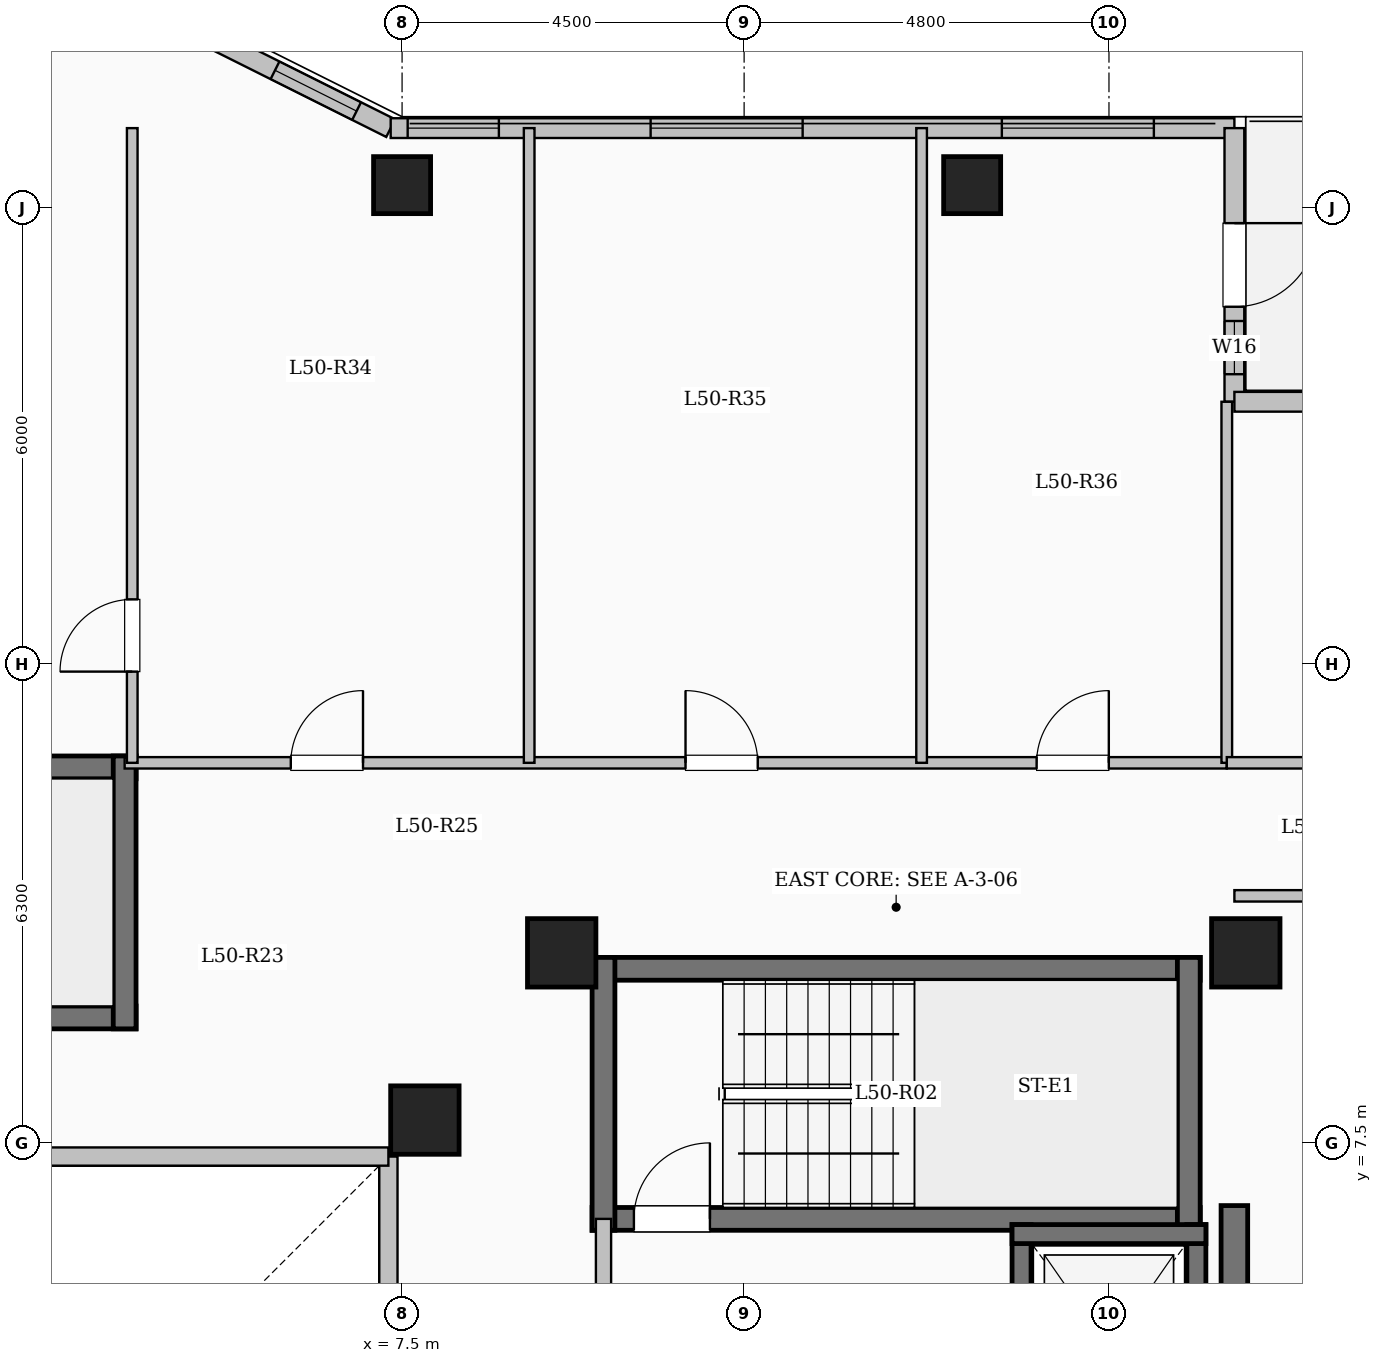
"""IFC4 building model, lengths in metres.
Left out: names, types, materials, properties, quantities, classifications, styles, units other than length and angle.
Written with IfcOpenShell. Run it as: python <this file> out.ifc"""

import sys

from ifc_helpers import new_model, si_unit, direction, frame, frame_2d, origin, origin_2d, place, context, subcontext, project, spatial, rectangle, extrude, element, fill, save


model = new_model("IFC4")
c1 = context("Model", 3, precision=1e-05, world=origin(), true_north=direction((0.0, 1.0)))
c2 = subcontext(c1, "Body", "Model", "MODEL_VIEW")
j1 = project(units=[si_unit("LENGTHUNIT", "METRE"), si_unit("PLANEANGLEUNIT", "RADIAN")], contexts=[c1])
p1 = place(None, origin())
s1 = spatial("IfcSite", under=j1, at=p1, CompositionType="ELEMENT")
p2 = place(p1, origin())
s2 = spatial("IfcBuilding", under=s1, at=p2, CompositionType="ELEMENT")
p3 = place(p2, frame((0.0, 0.0, 186.9)))
s3 = spatial("IfcBuildingStorey", under=s2, at=p3, CompositionType="ELEMENT", Elevation=186.9)
for number, where, z_axis, x_axis in (
    (1, (7.8, 7.8, 0.0), (0.0, 0.0, 1.0), (1.0, 0.0, 0.0)),
    (2, (9.6, 10.0, 0.0), (0.0, 0.0, 1.0), (1.0, 0.0, 0.0)),
    (3, (18.6, 10.0, 0.0), (0.0, 0.0, 1.0), (1.0, 0.0, 0.0)),
):
    element("IfcColumn", number, at=place(p3, frame(where, z_axis=z_axis, x_axis=x_axis)), inside=s3, PredefinedType="COLUMN", context=c2, shape_type="SweptSolid", body=[
        extrude(rectangle(XDim=0.9, YDim=0.9, at=origin_2d()), origin(), (0.0, 0.0, 1.0), 3.35),
    ])
for number, where, z_axis, x_axis in (
    (4, (7.5, 20.1, 0.0), (0.0, 0.0, 1.0), (1.0, 0.0, 0.0)),
    (5, (15.0, 20.1, 0.0), (0.0, 0.0, 1.0), (1.0, 0.0, 0.0)),
):
    element("IfcColumn", number, at=place(p3, frame(where, z_axis=z_axis, x_axis=x_axis)), inside=s3, PredefinedType="COLUMN", context=c2, shape_type="SweptSolid", body=[
        extrude(rectangle(XDim=0.75, YDim=0.75, at=origin_2d()), origin(), (0.0, 0.0, 1.0), 3.35),
    ])
p4 = place(p3, frame((7.32, -7.32, 0.0), z_axis=(0.0, 0.0, 1.0), x_axis=(0.0, 1.0, 0.0)))
e6 = element("IfcWall", 6, at=p4, inside=s3, PredefinedType="SOLIDWALL", context=c2, shape_type="SweptSolid", body=[
    extrude(rectangle(XDim=14.64, YDim=0.24, at=frame_2d((7.32, 0.0))), origin(), (0.0, 0.0, 1.0), 3.1),
])
p5 = place(p4, frame((6.62, 0.0, 0.95)))
e7 = element("IfcOpeningElement", 7, at=p5, cuts=e6, PredefinedType="OPENING", context=c2, shape_type="SweptSolid", body=[
    extrude(rectangle(XDim=1.4, YDim=1.5, at=frame_2d((0.7, 0.75))), frame((0.0, 0.13, 0.0), z_axis=(0.0, -1.0, 0.0), x_axis=(1.0, 0.0, 0.0)), (0.0, 0.0, 1.0), 0.26),
])
p6 = place(p3, frame((7.32, 7.32, 0.0), z_axis=(0.0, 0.0, 1.0), x_axis=(-1.0, 0.0, 0.0)))
e8 = element("IfcWall", 8, at=p6, inside=s3, PredefinedType="SOLIDWALL", context=c2, shape_type="SweptSolid", body=[
    extrude(rectangle(XDim=14.64, YDim=0.24, at=frame_2d((7.32, 0.0))), origin(), (0.0, 0.0, 1.0), 3.1),
])
p7 = place(p6, frame((6.62, 0.0, 0.95)))
e9 = element("IfcOpeningElement", 9, at=p7, cuts=e8, PredefinedType="OPENING", context=c2, shape_type="SweptSolid", body=[
    extrude(rectangle(XDim=1.4, YDim=1.5, at=frame_2d((0.7, 0.75))), frame((0.0, 0.13, 0.0), z_axis=(0.0, -1.0, 0.0), x_axis=(1.0, 0.0, 0.0)), (0.0, 0.0, 1.0), 0.26),
])
p8 = place(p3, frame((4.35, 22.35, 0.0), z_axis=(0.0, 0.0, 1.0), x_axis=(0.894427191, -0.4472135955, 0.0)))
e10 = element("IfcWall", 10, at=p8, inside=s3, PredefinedType="SOLIDWALL", context=c2, shape_type="SweptSolid", body=[
    extrude(rectangle(XDim=3.354, YDim=0.26, at=frame_2d((1.677, 0.0))), origin(), (0.0, 0.0, 1.0), 3.1),
])
p9 = place(p8, frame((1.653, 0.0, 0.95)))
e11 = element("IfcOpeningElement", 11, at=p9, cuts=e10, PredefinedType="OPENING", context=c2, shape_type="SweptSolid", body=[
    extrude(rectangle(XDim=1.2, YDim=1.5, at=frame_2d((0.6, 0.75))), frame((0.0, 0.14, 0.0), z_axis=(0.0, -1.0, 0.0), x_axis=(1.0, 0.0, 0.0)), (0.0, 0.0, 1.0), 0.28),
])
p10 = place(p3, frame((7.35, 20.85, 0.0), z_axis=(0.0, 0.0, 1.0), x_axis=(1.0, 0.0, 0.0)))
e12 = element("IfcWall", 12, at=p10, inside=s3, PredefinedType="SOLIDWALL", context=c2, shape_type="SweptSolid", body=[
    extrude(rectangle(XDim=11.1, YDim=0.26, at=frame_2d((5.55, 0.0))), origin(), (0.0, 0.0, 1.0), 3.1),
])
p11 = place(p10, frame((0.223, 0.0, 0.95)))
e13 = element("IfcOpeningElement", 13, at=p11, cuts=e12, PredefinedType="OPENING", context=c2, shape_type="SweptSolid", body=[
    extrude(rectangle(XDim=1.2, YDim=1.5, at=frame_2d((0.6, 0.75))), frame((0.0, 0.14, 0.0), z_axis=(0.0, -1.0, 0.0), x_axis=(1.0, 0.0, 0.0)), (0.0, 0.0, 1.0), 0.28),
])
p12 = place(p10, frame((3.42, 0.0, 0.9)))
e14 = element("IfcOpeningElement", 14, at=p12, cuts=e12, PredefinedType="OPENING", context=c2, shape_type="SweptSolid", body=[
    extrude(rectangle(XDim=2.0, YDim=1.7, at=frame_2d((1.0, 0.85))), frame((0.0, 0.14, 0.0), z_axis=(0.0, -1.0, 0.0), x_axis=(1.0, 0.0, 0.0)), (0.0, 0.0, 1.0), 0.28),
])
p13 = place(p10, frame((8.041, 0.0, 0.9)))
e15 = element("IfcOpeningElement", 15, at=p13, cuts=e12, PredefinedType="OPENING", context=c2, shape_type="SweptSolid", body=[
    extrude(rectangle(XDim=2.0, YDim=1.7, at=frame_2d((1.0, 0.85))), frame((0.0, 0.14, 0.0), z_axis=(0.0, -1.0, 0.0), x_axis=(1.0, 0.0, 0.0)), (0.0, 0.0, 1.0), 0.28),
])
p14 = place(p3, frame((18.45, 20.85, 0.0), z_axis=(0.0, 0.0, 1.0), x_axis=(0.0, -1.0, 0.0)))
e16 = element("IfcWall", 16, at=p14, inside=s3, PredefinedType="SOLIDWALL", context=c2, shape_type="SweptSolid", body=[
    extrude(rectangle(XDim=3.6, YDim=0.26, at=frame_2d((1.8, 0.0))), origin(), (0.0, 0.0, 1.0), 3.1),
])
p15 = place(p14, frame((1.25, 0.0, 0.0)))
e17 = element("IfcOpeningElement", 17, at=p15, cuts=e16, PredefinedType="OPENING", context=c2, shape_type="SweptSolid", body=[
    extrude(rectangle(XDim=1.1, YDim=2.2, at=frame_2d((0.55, 1.1))), frame((0.0, 0.14, 0.0), z_axis=(0.0, -1.0, 0.0), x_axis=(1.0, 0.0, 0.0)), (0.0, 0.0, 1.0), 0.28),
])
p16 = place(p14, frame((2.538, 0.0, 0.95)))
e18 = element("IfcOpeningElement", 18, at=p16, cuts=e16, PredefinedType="OPENING", context=c2, shape_type="SweptSolid", body=[
    extrude(rectangle(XDim=0.7, YDim=1.5, at=frame_2d((0.35, 0.75))), frame((0.0, 0.14, 0.0), z_axis=(0.0, -1.0, 0.0), x_axis=(1.0, 0.0, 0.0)), (0.0, 0.0, 1.0), 0.28),
])
p17 = place(p3, frame((18.45, 17.25, 0.0), z_axis=(0.0, 0.0, 1.0), x_axis=(1.0, 0.0, 0.0)))
e19 = element("IfcWall", 19, at=p17, inside=s3, PredefinedType="SOLIDWALL", context=c2, shape_type="SweptSolid", body=[
    extrude(rectangle(XDim=5.1, YDim=0.26, at=frame_2d((2.55, 0.0))), origin(), (0.0, 0.0, 1.0), 3.1),
])
p18 = place(p17, frame((1.525, 0.0, 0.9)))
e20 = element("IfcOpeningElement", 20, at=p18, cuts=e19, PredefinedType="OPENING", context=c2, shape_type="SweptSolid", body=[
    extrude(rectangle(XDim=2.0, YDim=1.7, at=frame_2d((1.0, 0.85))), frame((0.0, 0.14, 0.0), z_axis=(0.0, -1.0, 0.0), x_axis=(1.0, 0.0, 0.0)), (0.0, 0.0, 1.0), 0.28),
])
p19 = place(p3, frame((10.0, 9.79, 0.0), z_axis=(0.0, 0.0, 1.0), x_axis=(1.0, 0.0, 0.0)))
e21 = element("IfcWall", 21, at=p19, inside=s3, PredefinedType="SHEAR", context=c2, shape_type="SweptSolid", body=[
    extrude(rectangle(XDim=8.0, YDim=0.3, at=frame_2d((4.0, 0.0))), origin(), (0.0, 0.0, 1.0), 3.35),
])
p20 = place(p3, frame((10.0, 6.5, 0.0), z_axis=(0.0, 0.0, 1.0), x_axis=(1.0, 0.0, 0.0)))
e22 = element("IfcWall", 22, at=p20, inside=s3, PredefinedType="SHEAR", context=c2, shape_type="SweptSolid", body=[
    extrude(rectangle(XDim=8.0, YDim=0.3, at=frame_2d((4.0, 0.0))), origin(), (0.0, 0.0, 1.0), 3.35),
])
p21 = place(p20, frame((0.55, 0.0, 0.0)))
e23 = element("IfcOpeningElement", 23, at=p21, cuts=e22, PredefinedType="OPENING", context=c2, shape_type="SweptSolid", body=[
    extrude(rectangle(XDim=1.0, YDim=2.15, at=frame_2d((0.5, 1.075))), frame((0.0, 0.16, 0.0), z_axis=(0.0, -1.0, 0.0), x_axis=(1.0, 0.0, 0.0)), (0.0, 0.0, 1.0), 0.32),
])
for number, where, z_axis, x_axis in (
    (24, (10.15, 6.35, 0.0), (0.0, 0.0, 1.0), (0.0, 1.0, 0.0)),
    (25, (17.85, 6.35, 0.0), (0.0, 0.0, 1.0), (0.0, 1.0, 0.0)),
):
    element("IfcWall", number, at=place(p3, frame(where, z_axis=z_axis, x_axis=x_axis)), inside=s3, PredefinedType="SHEAR", context=c2, shape_type="SweptSolid", body=[
        extrude(rectangle(XDim=3.59, YDim=0.3, at=frame_2d((1.795, 0.0))), origin(), (0.0, 0.0, 1.0), 3.35),
    ])
p22 = place(p3, frame((-4.0, 12.44, 0.0), z_axis=(0.0, 0.0, 1.0), x_axis=(1.0, 0.0, 0.0)))
e26 = element("IfcWall", 26, at=p22, inside=s3, PredefinedType="SHEAR", context=c2, shape_type="SweptSolid", body=[
    extrude(rectangle(XDim=8.0, YDim=0.3, at=frame_2d((4.0, 0.0))), origin(), (0.0, 0.0, 1.0), 3.35),
])
p23 = place(p3, frame((-4.0, 9.15, 0.0), z_axis=(0.0, 0.0, 1.0), x_axis=(1.0, 0.0, 0.0)))
e27 = element("IfcWall", 27, at=p23, inside=s3, PredefinedType="SHEAR", context=c2, shape_type="SweptSolid", body=[
    extrude(rectangle(XDim=8.0, YDim=0.3, at=frame_2d((4.0, 0.0))), origin(), (0.0, 0.0, 1.0), 3.35),
])
p24 = place(p23, frame((0.55, 0.0, 0.0)))
e28 = element("IfcOpeningElement", 28, at=p24, cuts=e27, PredefinedType="OPENING", context=c2, shape_type="SweptSolid", body=[
    extrude(rectangle(XDim=1.0, YDim=2.15, at=frame_2d((0.5, 1.075))), frame((0.0, 0.16, 0.0), z_axis=(0.0, -1.0, 0.0), x_axis=(1.0, 0.0, 0.0)), (0.0, 0.0, 1.0), 0.32),
])
p25 = place(p3, frame((3.85, 9.0, 0.0), z_axis=(0.0, 0.0, 1.0), x_axis=(0.0, 1.0, 0.0)))
e29 = element("IfcWall", 29, at=p25, inside=s3, PredefinedType="SHEAR", context=c2, shape_type="SweptSolid", body=[
    extrude(rectangle(XDim=3.59, YDim=0.3, at=frame_2d((1.795, 0.0))), origin(), (0.0, 0.0, 1.0), 3.35),
])
p26 = place(p3, frame((10.15, 3.25, 0.0), z_axis=(0.0, 0.0, 1.0), x_axis=(0.0, 1.0, 0.0)))
e30 = element("IfcWall", 30, at=p26, inside=s3, PredefinedType="SOLIDWALL", context=c2, shape_type="SweptSolid", body=[
    extrude(rectangle(XDim=3.25, YDim=0.2, at=frame_2d((1.625, 0.0))), origin(), (0.0, 0.0, 1.0), 3.1),
])
p27 = place(p26, frame((1.1, 0.0, 0.0)))
e31 = element("IfcOpeningElement", 31, at=p27, cuts=e30, PredefinedType="OPENING", context=c2, shape_type="SweptSolid", body=[
    extrude(rectangle(XDim=1.02, YDim=2.15, at=frame_2d((0.51, 1.075))), frame((0.0, 0.11, 0.0), z_axis=(0.0, -1.0, 0.0), x_axis=(1.0, 0.0, 0.0)), (0.0, 0.0, 1.0), 0.22),
])
p28 = place(p3, frame((15.65, 3.175, 0.0), z_axis=(0.0, 0.0, 1.0), x_axis=(0.0, 1.0, 0.0)))
e32 = element("IfcWall", 32, at=p28, inside=s3, PredefinedType="SHEAR", context=c2, shape_type="SweptSolid", body=[
    extrude(rectangle(XDim=3.25, YDim=0.25, at=frame_2d((1.625, 0.0))), origin(), (0.0, 0.0, 1.0), 3.35),
])
p29 = place(p28, frame((1.075, 0.0, 0.0)))
e33 = element("IfcOpeningElement", 33, at=p29, cuts=e32, PredefinedType="OPENING", context=c2, shape_type="SweptSolid", body=[
    extrude(rectangle(XDim=1.1, YDim=2.15, at=frame_2d((0.55, 1.075))), frame((0.0, 0.135, 0.0), z_axis=(0.0, -1.0, 0.0), x_axis=(1.0, 0.0, 0.0)), (0.0, 0.0, 1.0), 0.27),
])
p30 = place(p3, frame((17.95, 3.175, 0.0), z_axis=(0.0, 0.0, 1.0), x_axis=(0.0, 1.0, 0.0)))
e34 = element("IfcWall", 34, at=p30, inside=s3, PredefinedType="SHEAR", context=c2, shape_type="SweptSolid", body=[
    extrude(rectangle(XDim=3.25, YDim=0.25, at=frame_2d((1.625, 0.0))), origin(), (0.0, 0.0, 1.0), 3.35),
])
p31 = place(p3, frame((15.525, 6.3, 0.0), z_axis=(0.0, 0.0, 1.0), x_axis=(1.0, 0.0, 0.0)))
e35 = element("IfcWall", 35, at=p31, inside=s3, PredefinedType="SHEAR", context=c2, shape_type="SweptSolid", body=[
    extrude(rectangle(XDim=2.55, YDim=0.25, at=frame_2d((1.275, 0.0))), origin(), (0.0, 0.0, 1.0), 3.35),
])
p32 = place(p3, frame((18.45, -7.375, 0.0), z_axis=(0.0, 0.0, 1.0), x_axis=(0.0, 1.0, 0.0)))
e36 = element("IfcWall", 36, at=p32, inside=s3, PredefinedType="SHEAR", context=c2, shape_type="SweptSolid", body=[
    extrude(rectangle(XDim=14.05, YDim=0.35, at=frame_2d((7.025, 0.0))), origin(), (0.0, 0.0, 1.0), 3.35),
])
p33 = place(p3, frame((3.85, 12.5, 0.0), z_axis=(0.0, 0.0, 1.0), x_axis=(1.0, 0.0, 0.0)))
e37 = element("IfcWall", 37, at=p33, inside=s3, PredefinedType="PARTITIONING", context=c2, shape_type="SweptSolid", body=[
    extrude(rectangle(XDim=14.5, YDim=0.15, at=frame_2d((7.25, 0.0))), origin(), (0.0, 0.0, 1.0), 3.1),
])
p34 = place(p33, frame((2.186, 0.0, 0.0)))
e38 = element("IfcOpeningElement", 38, at=p34, cuts=e37, PredefinedType="OPENING", context=c2, shape_type="SweptSolid", body=[
    extrude(rectangle(XDim=0.95, YDim=2.15, at=frame_2d((0.475, 1.075))), frame((0.0, 0.085, 0.0), z_axis=(0.0, -1.0, 0.0), x_axis=(1.0, 0.0, 0.0)), (0.0, 0.0, 1.0), 0.17),
])
p35 = place(p33, frame((7.379, 0.0, 0.0)))
e39 = element("IfcOpeningElement", 39, at=p35, cuts=e37, PredefinedType="OPENING", context=c2, shape_type="SweptSolid", body=[
    extrude(rectangle(XDim=0.95, YDim=2.15, at=frame_2d((0.475, 1.075))), frame((0.0, 0.085, 0.0), z_axis=(0.0, -1.0, 0.0), x_axis=(1.0, 0.0, 0.0)), (0.0, 0.0, 1.0), 0.17),
])
p36 = place(p33, frame((11.998, 0.0, 0.0)))
e40 = element("IfcOpeningElement", 40, at=p36, cuts=e37, PredefinedType="OPENING", context=c2, shape_type="SweptSolid", body=[
    extrude(rectangle(XDim=0.95, YDim=2.15, at=frame_2d((0.475, 1.075))), frame((0.0, 0.085, 0.0), z_axis=(0.0, -1.0, 0.0), x_axis=(1.0, 0.0, 0.0)), (0.0, 0.0, 1.0), 0.17),
])
p37 = place(p3, frame((3.95, 12.5, 0.0), z_axis=(0.0, 0.0, 1.0), x_axis=(0.0, 1.0, 0.0)))
e41 = element("IfcWall", 41, at=p37, inside=s3, PredefinedType="PARTITIONING", context=c2, shape_type="SweptSolid", body=[
    extrude(rectangle(XDim=8.35, YDim=0.14, at=frame_2d((4.175, 0.0))), origin(), (0.0, 0.0, 1.0), 3.1),
])
p38 = place(p37, frame((1.2, 0.0, 0.0)))
e42 = element("IfcOpeningElement", 42, at=p38, cuts=e41, PredefinedType="OPENING", context=c2, shape_type="SweptSolid", body=[
    extrude(rectangle(XDim=0.95, YDim=2.15, at=frame_2d((0.475, 1.075))), frame((0.0, 0.08, 0.0), z_axis=(0.0, -1.0, 0.0), x_axis=(1.0, 0.0, 0.0)), (0.0, 0.0, 1.0), 0.16),
])
for number, where, z_axis, x_axis in (
    (43, (9.172, 12.5, 0.0), (0.0, 0.0, 1.0), (0.0, 1.0, 0.0)),
    (44, (14.335, 12.5, 0.0), (0.0, 0.0, 1.0), (0.0, 1.0, 0.0)),
):
    element("IfcWall", number, at=place(p3, frame(where, z_axis=z_axis, x_axis=x_axis)), inside=s3, PredefinedType="PARTITIONING", context=c2, shape_type="SweptSolid", body=[
        extrude(rectangle(XDim=8.35, YDim=0.14, at=frame_2d((4.175, 0.0))), origin(), (0.0, 0.0, 1.0), 3.1),
    ])
p39 = place(p3, frame((18.45, 10.75, 0.0), z_axis=(0.0, 0.0, 1.0), x_axis=(1.0, 0.0, 0.0)))
e45 = element("IfcWall", 45, at=p39, inside=s3, PredefinedType="PARTITIONING", context=c2, shape_type="SweptSolid", body=[
    extrude(rectangle(XDim=5.13, YDim=0.15, at=frame_2d((2.565, 0.0))), origin(), (0.0, 0.0, 1.0), 3.1),
])
p40 = place(p3, frame((18.35, 12.5, 0.0), z_axis=(0.0, 0.0, 1.0), x_axis=(0.0, 1.0, 0.0)))
e46 = element("IfcWall", 46, at=p40, inside=s3, PredefinedType="PARTITIONING", context=c2, shape_type="SweptSolid", body=[
    extrude(rectangle(XDim=4.75, YDim=0.14, at=frame_2d((2.375, 0.0))), origin(), (0.0, 0.0, 1.0), 3.1),
])
p41 = place(p3, frame((18.35, 12.5, 0.0), z_axis=(0.0, 0.0, 1.0), x_axis=(1.0, 0.0, 0.0)))
e47 = element("IfcWall", 47, at=p41, inside=s3, PredefinedType="PARTITIONING", context=c2, shape_type="SweptSolid", body=[
    extrude(rectangle(XDim=5.23, YDim=0.15, at=frame_2d((2.615, 0.0))), origin(), (0.0, 0.0, 1.0), 3.1),
])
p42 = place(p41, frame((2.14, 0.0, 0.0)))
e48 = element("IfcOpeningElement", 48, at=p42, cuts=e47, PredefinedType="OPENING", context=c2, shape_type="SweptSolid", body=[
    extrude(rectangle(XDim=0.95, YDim=2.15, at=frame_2d((0.475, 1.075))), frame((0.0, 0.085, 0.0), z_axis=(0.0, -1.0, 0.0), x_axis=(1.0, 0.0, 0.0)), (0.0, 0.0, 1.0), 0.17),
])
p43 = place(p9, origin())
e49 = element("IfcWindow", 49, at=p43, inside=s3, PartitioningType="SINGLE_PANEL", PredefinedType="WINDOW", context=c2, shape_type="SweptSolid", body=[
    extrude(rectangle(XDim=1.2, YDim=1.5, at=frame_2d((0.6, 0.75))), frame((0.0, 0.03, 0.0), z_axis=(0.0, -1.0, 0.0), x_axis=(1.0, 0.0, 0.0)), (0.0, 0.0, 1.0), 0.06),
])
fill(e11, e49)
p44 = place(p11, origin())
e50 = element("IfcWindow", 50, at=p44, inside=s3, PartitioningType="SINGLE_PANEL", PredefinedType="WINDOW", context=c2, shape_type="SweptSolid", body=[
    extrude(rectangle(XDim=1.2, YDim=1.5, at=frame_2d((0.6, 0.75))), frame((0.0, 0.03, 0.0), z_axis=(0.0, -1.0, 0.0), x_axis=(1.0, 0.0, 0.0)), (0.0, 0.0, 1.0), 0.06),
])
fill(e13, e50)
p45 = place(p12, origin())
e51 = element("IfcWindow", 51, at=p45, inside=s3, PartitioningType="SINGLE_PANEL", PredefinedType="WINDOW", context=c2, shape_type="SweptSolid", body=[
    extrude(rectangle(XDim=2.0, YDim=1.7, at=frame_2d((1.0, 0.85))), frame((0.0, 0.03, 0.0), z_axis=(0.0, -1.0, 0.0), x_axis=(1.0, 0.0, 0.0)), (0.0, 0.0, 1.0), 0.06),
])
fill(e14, e51)
p46 = place(p13, origin())
e52 = element("IfcWindow", 52, at=p46, inside=s3, PartitioningType="SINGLE_PANEL", PredefinedType="WINDOW", context=c2, shape_type="SweptSolid", body=[
    extrude(rectangle(XDim=2.0, YDim=1.7, at=frame_2d((1.0, 0.85))), frame((0.0, 0.03, 0.0), z_axis=(0.0, -1.0, 0.0), x_axis=(1.0, 0.0, 0.0)), (0.0, 0.0, 1.0), 0.06),
])
fill(e15, e52)
p47 = place(p15, origin())
e53 = element("IfcDoor", 53, at=p47, inside=s3, OperationType="SINGLE_SWING_LEFT", PredefinedType="DOOR", context=c2, shape_type="SweptSolid", body=[
    extrude(rectangle(XDim=1.1, YDim=2.2, at=frame_2d((0.55, 1.1))), frame((0.0, 0.025, 0.0), z_axis=(0.0, -1.0, 0.0), x_axis=(1.0, 0.0, 0.0)), (0.0, 0.0, 1.0), 0.05),
])
fill(e17, e53)
p48 = place(p16, origin())
e54 = element("IfcWindow", 54, at=p48, inside=s3, PartitioningType="SINGLE_PANEL", PredefinedType="WINDOW", context=c2, shape_type="SweptSolid", body=[
    extrude(rectangle(XDim=0.7, YDim=1.5, at=frame_2d((0.35, 0.75))), frame((0.0, 0.03, 0.0), z_axis=(0.0, -1.0, 0.0), x_axis=(1.0, 0.0, 0.0)), (0.0, 0.0, 1.0), 0.06),
])
fill(e18, e54)
p49 = place(p21, origin())
e55 = element("IfcDoor", 55, at=p49, inside=s3, OperationType="SINGLE_SWING_RIGHT", PredefinedType="DOOR", context=c2, shape_type="SweptSolid", body=[
    extrude(rectangle(XDim=1.0, YDim=2.15, at=frame_2d((0.5, 1.075))), frame((0.0, 0.025, 0.0), z_axis=(0.0, -1.0, 0.0), x_axis=(1.0, 0.0, 0.0)), (0.0, 0.0, 1.0), 0.05),
])
fill(e23, e55)
p50 = place(p34, origin())
e56 = element("IfcDoor", 56, at=p50, inside=s3, OperationType="SINGLE_SWING_RIGHT", PredefinedType="DOOR", context=c2, shape_type="SweptSolid", body=[
    extrude(rectangle(XDim=0.95, YDim=2.15, at=frame_2d((0.475, 1.075))), frame((0.0, 0.025, 0.0), z_axis=(0.0, -1.0, 0.0), x_axis=(1.0, 0.0, 0.0)), (0.0, 0.0, 1.0), 0.05),
])
fill(e38, e56)
p51 = place(p35, origin())
e57 = element("IfcDoor", 57, at=p51, inside=s3, OperationType="SINGLE_SWING_LEFT", PredefinedType="DOOR", context=c2, shape_type="SweptSolid", body=[
    extrude(rectangle(XDim=0.95, YDim=2.15, at=frame_2d((0.475, 1.075))), frame((0.0, 0.025, 0.0), z_axis=(0.0, -1.0, 0.0), x_axis=(1.0, 0.0, 0.0)), (0.0, 0.0, 1.0), 0.05),
])
fill(e39, e57)
p52 = place(p36, origin())
e58 = element("IfcDoor", 58, at=p52, inside=s3, OperationType="SINGLE_SWING_RIGHT", PredefinedType="DOOR", context=c2, shape_type="SweptSolid", body=[
    extrude(rectangle(XDim=0.95, YDim=2.15, at=frame_2d((0.475, 1.075))), frame((0.0, 0.025, 0.0), z_axis=(0.0, -1.0, 0.0), x_axis=(1.0, 0.0, 0.0)), (0.0, 0.0, 1.0), 0.05),
])
fill(e40, e58)
p53 = place(p38, origin())
e59 = element("IfcDoor", 59, at=p53, inside=s3, OperationType="SINGLE_SWING_LEFT", PredefinedType="DOOR", context=c2, shape_type="SweptSolid", body=[
    extrude(rectangle(XDim=0.95, YDim=2.15, at=frame_2d((0.475, 1.075))), frame((0.0, 0.025, 0.0), z_axis=(0.0, -1.0, 0.0), x_axis=(1.0, 0.0, 0.0)), (0.0, 0.0, 1.0), 0.05),
])
fill(e42, e59)
save(model, sys.argv[1])
